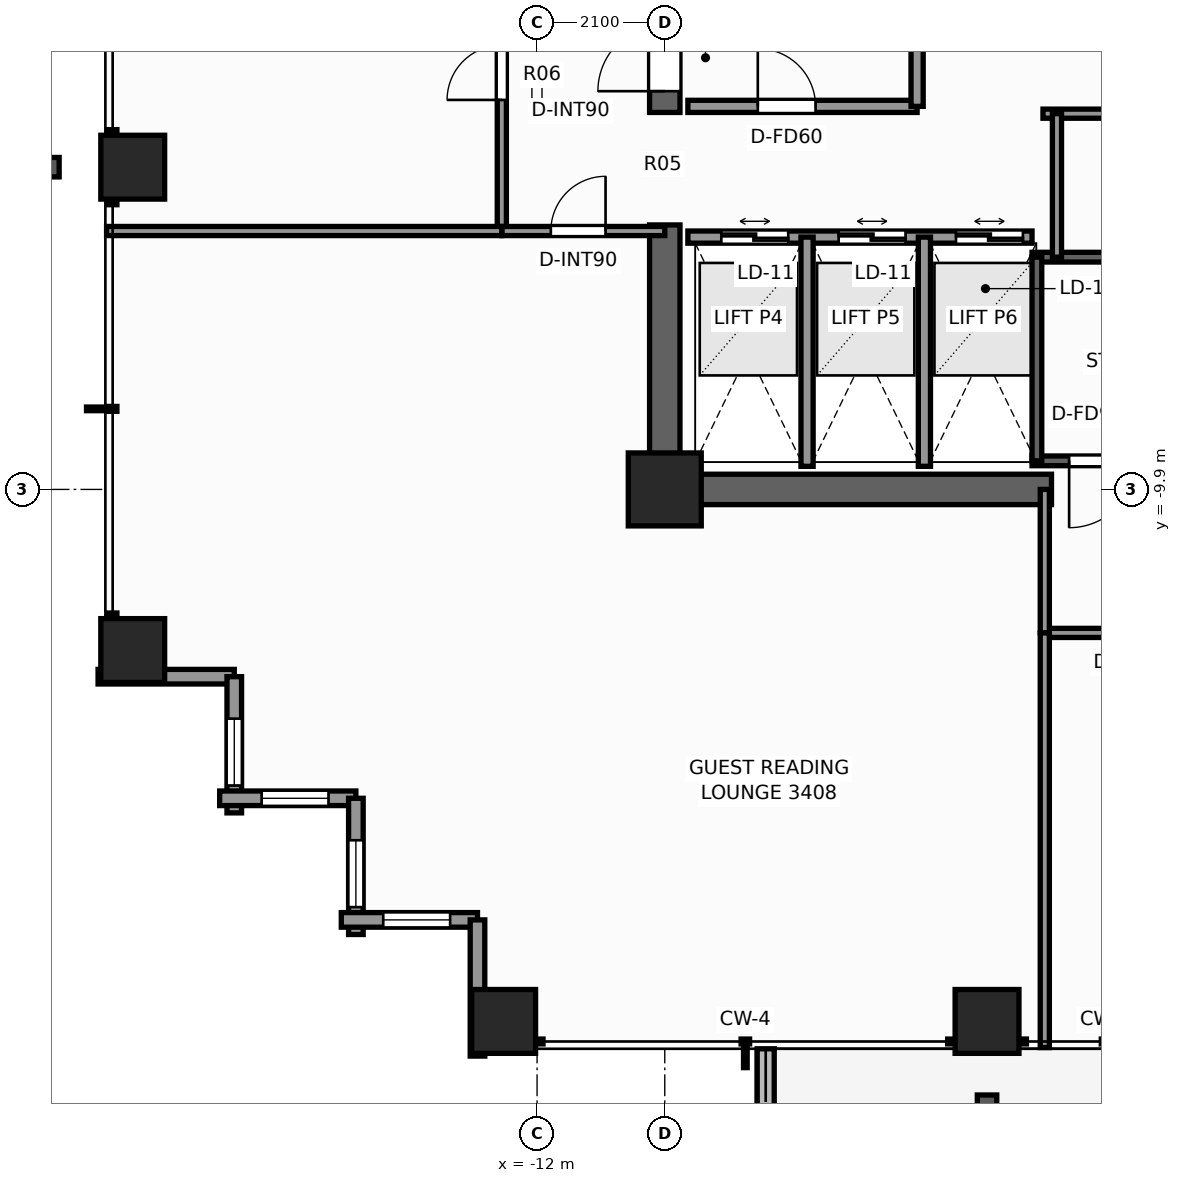
"""IFC4 building model, lengths in metres.
Left out: names, types, materials, properties, quantities, classifications, styles, units other than length and angle.
Written with IfcOpenShell. Run it as: python <this file> out.ifc"""

import sys

from ifc_helpers import new_model, si_unit, direction, frame, frame_2d, origin, origin_2d, place, context, subcontext, project, spatial, rectangle, extrude, element, fill, save


model = new_model("IFC4")
c1 = context("Model", 3, precision=1e-05, world=origin(), true_north=direction((0.0, 1.0)))
c2 = subcontext(c1, "Body", "Model", "MODEL_VIEW")
j1 = project(units=[si_unit("LENGTHUNIT", "METRE"), si_unit("PLANEANGLEUNIT", "RADIAN")], contexts=[c1])
p1 = place(None, origin())
s1 = spatial("IfcSite", under=j1, at=p1, CompositionType="ELEMENT")
p2 = place(p1, origin())
s2 = spatial("IfcBuilding", under=s1, at=p2, CompositionType="ELEMENT")
p3 = place(p2, frame((0.0, 0.0, 118.4)))
s3 = spatial("IfcBuildingStorey", under=s2, at=p3, CompositionType="ELEMENT", Elevation=118.4)
p4 = place(p3, frame((-3.54, -9.9, 0.0), z_axis=(0.0, 0.0, 1.0), x_axis=(-1.0, 0.0, 0.0)))
e1 = element("IfcWall", 1, at=p4, inside=s3, PredefinedType="SHEAR", context=c2, shape_type="SweptSolid", body=[
    extrude(rectangle(XDim=6.61, YDim=0.5, at=frame_2d((3.305, 0.0))), origin(), (0.0, 0.0, 1.0), 3.3),
])
p5 = place(p3, frame((-9.9, -9.65, 0.0), z_axis=(0.0, 0.0, 1.0), x_axis=(0.0, 1.0, 0.0)))
e2 = element("IfcWall", 2, at=p5, inside=s3, PredefinedType="SHEAR", context=c2, shape_type="SweptSolid", body=[
    extrude(rectangle(XDim=4.1, YDim=0.5, at=frame_2d((2.05, 0.0))), origin(), (0.0, 0.0, 1.0), 3.3),
])
p6 = place(p3, frame((-9.9, -3.7, 0.0), z_axis=(0.0, 0.0, 1.0), x_axis=(0.0, 1.0, 0.0)))
e3 = element("IfcWall", 3, at=p6, inside=s3, PredefinedType="SHEAR", context=c2, shape_type="SweptSolid", body=[
    extrude(rectangle(XDim=13.35, YDim=0.5, at=frame_2d((6.675, 0.0))), origin(), (0.0, 0.0, 1.0), 3.3),
])
p7 = place(p6, frame((0.35, 0.0, 0.0)))
e4 = element("IfcOpeningElement", 4, at=p7, cuts=e3, PredefinedType="OPENING", context=c2, shape_type="SweptSolid", body=[
    extrude(rectangle(XDim=1.1, YDim=2.2, at=frame_2d((0.55, 1.1))), frame((0.0, 0.26, 0.0), z_axis=(0.0, -1.0, 0.0), x_axis=(1.0, 0.0, 0.0)), (0.0, 0.0, 1.0), 0.52),
])
p8 = place(p3, frame((-9.9, -9.9, 0.0), z_axis=(0.0, 0.0, 1.0), x_axis=(1.0, 0.0, 0.0)))
e5 = element("IfcColumn", 5, at=p8, inside=s3, PredefinedType="COLUMN", context=c2, shape_type="SweptSolid", body=[
    extrude(rectangle(XDim=1.2, YDim=1.2, at=origin_2d()), origin(), (0.0, 0.0, 1.0), 3.3),
])
for number, where, z_axis, x_axis in (
    (6, (-12.55, -18.65, 0.0), (0.0, 0.0, 1.0), (1.0, 0.0, 0.0)),
    (7, (-4.6, -18.65, 0.0), (0.0, 0.0, 1.0), (1.0, 0.0, 0.0)),
    (8, (-18.65, -12.55, 0.0), (0.0, 0.0, 1.0), (1.0, 0.0, 0.0)),
    (9, (-18.65, -4.6, 0.0), (0.0, 0.0, 1.0), (1.0, 0.0, 0.0)),
):
    element("IfcColumn", number, at=place(p3, frame(where, z_axis=z_axis, x_axis=x_axis)), inside=s3, PredefinedType="COLUMN", context=c2, shape_type="SweptSolid", body=[
        extrude(rectangle(XDim=1.05, YDim=1.05, at=origin_2d()), origin(), (0.0, 0.0, 1.0), 3.3),
    ])
p9 = place(p3, frame((-8.24, -19.1, -0.04), z_axis=(0.0, 0.0, 1.0), x_axis=(0.0, -1.0, 0.0)))
e10 = element("IfcWall", 10, at=p9, inside=s3, PredefinedType="PARAPET", context=c2, shape_type="SweptSolid", body=[
    extrude(rectangle(XDim=2.674, YDim=0.28, at=frame_2d((1.337, 0.0))), origin(), (0.0, 0.0, 1.0), 0.42),
])
p10 = place(p3, frame((-16.98, -12.98, 0.0), z_axis=(0.0, 0.0, 1.0), x_axis=(-1.0, 0.0, 0.0)))
e11 = element("IfcWall", 11, at=p10, inside=s3, PredefinedType="STANDARD", context=c2, shape_type="SweptSolid", body=[
    extrude(rectangle(XDim=2.24, YDim=0.24, at=frame_2d((1.12, 0.0))), origin(), (0.0, 0.0, 1.0), 2.459),
])
p11 = place(p3, frame((-16.98, -15.22, 0.0), z_axis=(0.0, 0.0, 1.0), x_axis=(0.0, 1.0, 0.0)))
e12 = element("IfcWall", 12, at=p11, inside=s3, PredefinedType="STANDARD", context=c2, shape_type="SweptSolid", body=[
    extrude(rectangle(XDim=2.24, YDim=0.24, at=frame_2d((1.12, 0.0))), origin(), (0.0, 0.0, 1.0), 2.459),
])
p12 = place(p11, frame((0.45, 0.0, 0.65)))
e13 = element("IfcOpeningElement", 13, at=p12, cuts=e12, PredefinedType="OPENING", context=c2, shape_type="SweptSolid", body=[
    extrude(rectangle(XDim=1.1, YDim=1.45, at=frame_2d((0.55, 0.725))), frame((0.0, 0.13, 0.0), z_axis=(0.0, -1.0, 0.0), x_axis=(1.0, 0.0, 0.0)), (0.0, 0.0, 1.0), 0.26),
])
p13 = place(p3, frame((-14.98, -14.98, 0.0), z_axis=(0.0, 0.0, 1.0), x_axis=(-1.0, 0.0, 0.0)))
e14 = element("IfcWall", 14, at=p13, inside=s3, PredefinedType="STANDARD", context=c2, shape_type="SweptSolid", body=[
    extrude(rectangle(XDim=2.24, YDim=0.24, at=frame_2d((1.12, 0.0))), origin(), (0.0, 0.0, 1.0), 2.459),
])
p14 = place(p13, frame((0.45, 0.0, 0.65)))
e15 = element("IfcOpeningElement", 15, at=p14, cuts=e14, PredefinedType="OPENING", context=c2, shape_type="SweptSolid", body=[
    extrude(rectangle(XDim=1.1, YDim=1.45, at=frame_2d((0.55, 0.725))), frame((0.0, 0.13, 0.0), z_axis=(0.0, -1.0, 0.0), x_axis=(1.0, 0.0, 0.0)), (0.0, 0.0, 1.0), 0.26),
])
p15 = place(p3, frame((-14.98, -17.22, 0.0), z_axis=(0.0, 0.0, 1.0), x_axis=(0.0, 1.0, 0.0)))
e16 = element("IfcWall", 16, at=p15, inside=s3, PredefinedType="STANDARD", context=c2, shape_type="SweptSolid", body=[
    extrude(rectangle(XDim=2.24, YDim=0.24, at=frame_2d((1.12, 0.0))), origin(), (0.0, 0.0, 1.0), 2.459),
])
p16 = place(p15, frame((0.45, 0.0, 0.65)))
e17 = element("IfcOpeningElement", 17, at=p16, cuts=e16, PredefinedType="OPENING", context=c2, shape_type="SweptSolid", body=[
    extrude(rectangle(XDim=1.1, YDim=1.45, at=frame_2d((0.55, 0.725))), frame((0.0, 0.13, 0.0), z_axis=(0.0, -1.0, 0.0), x_axis=(1.0, 0.0, 0.0)), (0.0, 0.0, 1.0), 0.26),
])
p17 = place(p3, frame((-12.98, -16.98, 0.0), z_axis=(0.0, 0.0, 1.0), x_axis=(-1.0, 0.0, 0.0)))
e18 = element("IfcWall", 18, at=p17, inside=s3, PredefinedType="STANDARD", context=c2, shape_type="SweptSolid", body=[
    extrude(rectangle(XDim=2.24, YDim=0.24, at=frame_2d((1.12, 0.0))), origin(), (0.0, 0.0, 1.0), 2.459),
])
p18 = place(p17, frame((0.45, 0.0, 0.65)))
e19 = element("IfcOpeningElement", 19, at=p18, cuts=e18, PredefinedType="OPENING", context=c2, shape_type="SweptSolid", body=[
    extrude(rectangle(XDim=1.1, YDim=1.45, at=frame_2d((0.55, 0.725))), frame((0.0, 0.13, 0.0), z_axis=(0.0, -1.0, 0.0), x_axis=(1.0, 0.0, 0.0)), (0.0, 0.0, 1.0), 0.26),
])
p19 = place(p3, frame((-12.98, -19.22, 0.0), z_axis=(0.0, 0.0, 1.0), x_axis=(0.0, 1.0, 0.0)))
e20 = element("IfcWall", 20, at=p19, inside=s3, PredefinedType="STANDARD", context=c2, shape_type="SweptSolid", body=[
    extrude(rectangle(XDim=2.24, YDim=0.24, at=frame_2d((1.12, 0.0))), origin(), (0.0, 0.0, 1.0), 2.459),
])
p20 = place(p3, frame((3.86, -9.43, 0.0), z_axis=(0.0, 0.0, 1.0), x_axis=(-1.0, 0.0, 0.0)))
e21 = element("IfcWall", 21, at=p20, inside=s3, PredefinedType="SHEAR", context=c2, shape_type="SweptSolid", body=[
    extrude(rectangle(XDim=7.72, YDim=0.16, at=frame_2d((3.86, 0.0))), origin(), (0.0, 0.0, 1.0), 3.3),
])
p21 = place(p20, frame((6.01, 0.0, 0.0)))
e22 = element("IfcOpeningElement", 22, at=p21, cuts=e21, PredefinedType="OPENING", context=c2, shape_type="SweptSolid", body=[
    extrude(rectangle(XDim=1.1, YDim=2.2, at=frame_2d((0.55, 1.1))), frame((0.0, 0.09, 0.0), z_axis=(0.0, -1.0, 0.0), x_axis=(1.0, 0.0, 0.0)), (0.0, 0.0, 1.0), 0.18),
])
p22 = place(p3, frame((-3.86, -6.08, 0.0), z_axis=(0.0, 0.0, 1.0), x_axis=(1.0, 0.0, 0.0)))
e23 = element("IfcWall", 23, at=p22, inside=s3, PredefinedType="SHEAR", context=c2, shape_type="SweptSolid", body=[
    extrude(rectangle(XDim=7.72, YDim=0.16, at=frame_2d((3.86, 0.0))), origin(), (0.0, 0.0, 1.0), 3.3),
])
p23 = place(p3, frame((-3.78, -9.43, 0.0), z_axis=(0.0, 0.0, 1.0), x_axis=(0.0, 1.0, 0.0)))
e24 = element("IfcWall", 24, at=p23, inside=s3, PredefinedType="SHEAR", context=c2, shape_type="SweptSolid", body=[
    extrude(rectangle(XDim=3.35, YDim=0.16, at=frame_2d((1.675, 0.0))), origin(), (0.0, 0.0, 1.0), 3.3),
])
p24 = place(p3, frame((-9.52, -3.6, 0.0), z_axis=(0.0, 0.0, 1.0), x_axis=(1.0, 0.0, 0.0)))
e25 = element("IfcWall", 25, at=p24, inside=s3, PredefinedType="SOLIDWALL", context=c2, shape_type="SweptSolid", body=[
    extrude(rectangle(XDim=3.77, YDim=0.2, at=frame_2d((1.885, 0.0))), origin(), (0.0, 0.0, 1.0), 3.08),
])
p25 = place(p24, frame((1.15, 0.0, 0.0)))
e26 = element("IfcOpeningElement", 26, at=p25, cuts=e25, PredefinedType="OPENING", context=c2, shape_type="SweptSolid", body=[
    extrude(rectangle(XDim=0.95, YDim=2.06, at=frame_2d((0.475, 1.03))), frame((0.0, 0.11, 0.0), z_axis=(0.0, -1.0, 0.0), x_axis=(1.0, 0.0, 0.0)), (0.0, 0.0, 1.0), 0.22),
])
p26 = place(p3, frame((-5.75, -3.6, 0.0), z_axis=(0.0, 0.0, 1.0), x_axis=(0.0, 1.0, 0.0)))
e27 = element("IfcWall", 27, at=p26, inside=s3, PredefinedType="SOLIDWALL", context=c2, shape_type="SweptSolid", body=[
    extrude(rectangle(XDim=5.57, YDim=0.2, at=frame_2d((2.785, 0.0))), origin(), (0.0, 0.0, 1.0), 2.715),
])
p27 = place(p26, frame((2.75, 0.0, 0.0)))
e28 = element("IfcOpeningElement", 28, at=p27, cuts=e27, PredefinedType="OPENING", context=c2, shape_type="SweptSolid", body=[
    extrude(rectangle(XDim=1.1, YDim=2.2, at=frame_2d((0.55, 1.1))), frame((0.0, 0.11, 0.0), z_axis=(0.0, -1.0, 0.0), x_axis=(1.0, 0.0, 0.0)), (0.0, 0.0, 1.0), 0.22),
])
p28 = place(p3, frame((-9.52, -5.75, 0.0), z_axis=(0.0, 0.0, 1.0), x_axis=(1.0, 0.0, 0.0)))
e29 = element("IfcWall", 29, at=p28, inside=s3, PredefinedType="SOLIDWALL", context=c2, shape_type="SweptSolid", body=[
    extrude(rectangle(XDim=5.66, YDim=0.2, at=frame_2d((2.83, 0.0))), origin(), (0.0, 0.0, 1.0), 3.08),
])
p29 = place(p28, frame((0.55, 0.0, 0.0)))
e30 = element("IfcOpeningElement", 30, at=p29, cuts=e29, PredefinedType="OPENING", context=c2, shape_type="SweptSolid", body=[
    extrude(rectangle(XDim=1.1, YDim=2.2, at=frame_2d((0.55, 1.1))), frame((0.0, 0.11, 0.0), z_axis=(0.0, -1.0, 0.0), x_axis=(1.0, 0.0, 0.0)), (0.0, 0.0, 1.0), 0.22),
])
p30 = place(p28, frame((2.48, 0.0, 0.0)))
e31 = element("IfcOpeningElement", 31, at=p30, cuts=e29, PredefinedType="OPENING", context=c2, shape_type="SweptSolid", body=[
    extrude(rectangle(XDim=1.1, YDim=2.2, at=frame_2d((0.55, 1.1))), frame((0.0, 0.11, 0.0), z_axis=(0.0, -1.0, 0.0), x_axis=(1.0, 0.0, 0.0)), (0.0, 0.0, 1.0), 0.22),
])
p31 = place(p28, frame((4.41, 0.0, 0.0)))
e32 = element("IfcOpeningElement", 32, at=p31, cuts=e29, PredefinedType="OPENING", context=c2, shape_type="SweptSolid", body=[
    extrude(rectangle(XDim=1.1, YDim=2.2, at=frame_2d((0.55, 1.1))), frame((0.0, 0.11, 0.0), z_axis=(0.0, -1.0, 0.0), x_axis=(1.0, 0.0, 0.0)), (0.0, 0.0, 1.0), 0.22),
])
for number, where, z_axis, x_axis in (
    (33, (-7.56, -9.52, 0.0), (0.0, 0.0, 1.0), (0.0, 1.0, 0.0)),
    (34, (-5.63, -9.52, 0.0), (0.0, 0.0, 1.0), (0.0, 1.0, 0.0)),
):
    element("IfcWall", number, at=place(p3, frame(where, z_axis=z_axis, x_axis=x_axis)), inside=s3, PredefinedType="SOLIDWALL", context=c2, shape_type="SweptSolid", body=[
        extrude(rectangle(XDim=3.77, YDim=0.2, at=frame_2d((1.885, 0.0))), origin(), (0.0, 0.0, 1.0), 3.08),
    ])
p32 = place(p3, frame((-3.68, -3.72, 0.0), z_axis=(0.0, 0.0, 1.0), x_axis=(1.0, 0.0, 0.0)))
e35 = element("IfcWall", 35, at=p32, inside=s3, PredefinedType="PARTITIONING", context=c2, shape_type="SweptSolid", body=[
    extrude(rectangle(XDim=7.36, YDim=0.15, at=frame_2d((3.68, 0.0))), origin(), (0.0, 0.0, 1.0), 3.08),
])
p33 = place(p3, frame((-3.45, -6.08, 0.0), z_axis=(0.0, 0.0, 1.0), x_axis=(0.0, 1.0, 0.0)))
e36 = element("IfcWall", 36, at=p33, inside=s3, PredefinedType="PARTITIONING", context=c2, shape_type="SweptSolid", body=[
    extrude(rectangle(XDim=2.36, YDim=0.15, at=frame_2d((1.18, 0.0))), origin(), (0.0, 0.0, 1.0), 3.08),
])
p34 = place(p3, frame((-3.65, -12.26, 0.0), z_axis=(0.0, 0.0, 1.0), x_axis=(1.0, 0.0, 0.0)))
e37 = element("IfcWall", 37, at=p34, inside=s3, PredefinedType="PARTITIONING", context=c2, shape_type="SweptSolid", body=[
    extrude(rectangle(XDim=15.91, YDim=0.15, at=frame_2d((7.955, 0.0))), origin(), (0.0, 0.0, 1.0), 2.292),
])
p35 = place(p34, frame((0.992, 0.0, 0.0)))
e38 = element("IfcOpeningElement", 38, at=p35, cuts=e37, PredefinedType="OPENING", context=c2, shape_type="SweptSolid", body=[
    extrude(rectangle(XDim=0.9, YDim=2.06, at=frame_2d((0.45, 1.03))), frame((0.0, 0.085, 0.0), z_axis=(0.0, -1.0, 0.0), x_axis=(1.0, 0.0, 0.0)), (0.0, 0.0, 1.0), 0.17),
])
p36 = place(p34, frame((5.019, 0.0, 0.0)))
e39 = element("IfcOpeningElement", 39, at=p36, cuts=e37, PredefinedType="OPENING", context=c2, shape_type="SweptSolid", body=[
    extrude(rectangle(XDim=0.95, YDim=2.06, at=frame_2d((0.475, 1.03))), frame((0.0, 0.085, 0.0), z_axis=(0.0, -1.0, 0.0), x_axis=(1.0, 0.0, 0.0)), (0.0, 0.0, 1.0), 0.17),
])
p37 = place(p34, frame((11.288, 0.0, 0.0)))
e40 = element("IfcOpeningElement", 40, at=p37, cuts=e37, PredefinedType="OPENING", context=c2, shape_type="SweptSolid", body=[
    extrude(rectangle(XDim=0.95, YDim=2.06, at=frame_2d((0.475, 1.03))), frame((0.0, 0.085, 0.0), z_axis=(0.0, -1.0, 0.0), x_axis=(1.0, 0.0, 0.0)), (0.0, 0.0, 1.0), 0.17),
])
p38 = place(p3, frame((-3.65, -12.26, 0.0), z_axis=(0.0, 0.0, 1.0), x_axis=(0.0, 1.0, 0.0)))
e41 = element("IfcWall", 41, at=p38, inside=s3, PredefinedType="PARTITIONING", context=c2, shape_type="SweptSolid", body=[
    extrude(rectangle(XDim=2.36, YDim=0.15, at=frame_2d((1.18, 0.0))), origin(), (0.0, 0.0, 1.0), 3.08),
])
p39 = place(p3, frame((-12.58, -5.65, 0.0), z_axis=(0.0, 0.0, 1.0), x_axis=(0.0, 1.0, 0.0)))
e42 = element("IfcWall", 42, at=p39, inside=s3, PredefinedType="PARTITIONING", context=c2, shape_type="SweptSolid", body=[
    extrude(rectangle(XDim=3.6, YDim=0.15, at=frame_2d((1.8, 0.0))), origin(), (0.0, 0.0, 1.0), 2.292),
])
p40 = place(p39, frame((2.156, 0.0, 0.0)))
e43 = element("IfcOpeningElement", 43, at=p40, cuts=e42, PredefinedType="OPENING", context=c2, shape_type="SweptSolid", body=[
    extrude(rectangle(XDim=0.9, YDim=2.06, at=frame_2d((0.45, 1.03))), frame((0.0, 0.085, 0.0), z_axis=(0.0, -1.0, 0.0), x_axis=(1.0, 0.0, 0.0)), (0.0, 0.0, 1.0), 0.17),
])
p41 = place(p3, frame((-12.58, -5.65, 0.0), z_axis=(0.0, 0.0, 1.0), x_axis=(1.0, 0.0, 0.0)))
e44 = element("IfcWall", 44, at=p41, inside=s3, PredefinedType="PARTITIONING", context=c2, shape_type="SweptSolid", body=[
    extrude(rectangle(XDim=2.68, YDim=0.15, at=frame_2d((1.34, 0.0))), origin(), (0.0, 0.0, 1.0), 3.08),
])
p42 = place(p41, frame((0.806, 0.0, 0.0)))
e45 = element("IfcOpeningElement", 45, at=p42, cuts=e44, PredefinedType="OPENING", context=c2, shape_type="SweptSolid", body=[
    extrude(rectangle(XDim=0.9, YDim=2.06, at=frame_2d((0.45, 1.03))), frame((0.0, 0.085, 0.0), z_axis=(0.0, -1.0, 0.0), x_axis=(1.0, 0.0, 0.0)), (0.0, 0.0, 1.0), 0.17),
])
p43 = place(p3, frame((-19.08, -5.65, 0.0), z_axis=(0.0, 0.0, 1.0), x_axis=(1.0, 0.0, 0.0)))
e46 = element("IfcWall", 46, at=p43, inside=s3, PredefinedType="PARTITIONING", context=c2, shape_type="SweptSolid", body=[
    extrude(rectangle(XDim=6.5, YDim=0.15, at=frame_2d((3.25, 0.0))), origin(), (0.0, 0.0, 1.0), 2.449),
])
p44 = place(p3, frame((-3.65, -19.08, 0.0), z_axis=(0.0, 0.0, 1.0), x_axis=(0.0, 1.0, 0.0)))
e47 = element("IfcWall", 47, at=p44, inside=s3, PredefinedType="PARTITIONING", context=c2, shape_type="SweptSolid", body=[
    extrude(rectangle(XDim=6.82, YDim=0.15, at=frame_2d((3.41, 0.0))), origin(), (0.0, 0.0, 1.0), 2.449),
])
p45 = place(p12, origin())
e48 = element("IfcWindow", 48, at=p45, inside=s3, PartitioningType="SINGLE_PANEL", PredefinedType="WINDOW", context=c2, shape_type="SweptSolid", body=[
    extrude(rectangle(XDim=1.1, YDim=1.45, at=frame_2d((0.55, 0.725))), frame((0.0, 0.03, 0.0), z_axis=(0.0, -1.0, 0.0), x_axis=(1.0, 0.0, 0.0)), (0.0, 0.0, 1.0), 0.06),
])
fill(e13, e48)
p46 = place(p14, origin())
e49 = element("IfcWindow", 49, at=p46, inside=s3, PartitioningType="SINGLE_PANEL", PredefinedType="WINDOW", context=c2, shape_type="SweptSolid", body=[
    extrude(rectangle(XDim=1.1, YDim=1.45, at=frame_2d((0.55, 0.725))), frame((0.0, 0.03, 0.0), z_axis=(0.0, -1.0, 0.0), x_axis=(1.0, 0.0, 0.0)), (0.0, 0.0, 1.0), 0.06),
])
fill(e15, e49)
p47 = place(p16, origin())
e50 = element("IfcWindow", 50, at=p47, inside=s3, PartitioningType="SINGLE_PANEL", PredefinedType="WINDOW", context=c2, shape_type="SweptSolid", body=[
    extrude(rectangle(XDim=1.1, YDim=1.45, at=frame_2d((0.55, 0.725))), frame((0.0, 0.03, 0.0), z_axis=(0.0, -1.0, 0.0), x_axis=(1.0, 0.0, 0.0)), (0.0, 0.0, 1.0), 0.06),
])
fill(e17, e50)
p48 = place(p18, origin())
e51 = element("IfcWindow", 51, at=p48, inside=s3, PartitioningType="SINGLE_PANEL", PredefinedType="WINDOW", context=c2, shape_type="SweptSolid", body=[
    extrude(rectangle(XDim=1.1, YDim=1.45, at=frame_2d((0.55, 0.725))), frame((0.0, 0.03, 0.0), z_axis=(0.0, -1.0, 0.0), x_axis=(1.0, 0.0, 0.0)), (0.0, 0.0, 1.0), 0.06),
])
fill(e19, e51)
p49 = place(p21, origin())
e52 = element("IfcDoor", 52, at=p49, inside=s3, OperationType="SINGLE_SWING_RIGHT", PredefinedType="DOOR", context=c2, shape_type="SweptSolid", body=[
    extrude(rectangle(XDim=1.1, YDim=2.2, at=frame_2d((0.55, 1.1))), frame((0.0, 0.025, 0.0), z_axis=(0.0, -1.0, 0.0), x_axis=(1.0, 0.0, 0.0)), (0.0, 0.0, 1.0), 0.05),
])
fill(e22, e52)
p50 = place(p7, origin())
e53 = element("IfcDoor", 53, at=p50, inside=s3, OperationType="SINGLE_SWING_LEFT", PredefinedType="DOOR", context=c2, shape_type="SweptSolid", body=[
    extrude(rectangle(XDim=1.1, YDim=2.2, at=frame_2d((0.55, 1.1))), frame((0.0, 0.025, 0.0), z_axis=(0.0, -1.0, 0.0), x_axis=(1.0, 0.0, 0.0)), (0.0, 0.0, 1.0), 0.05),
])
fill(e4, e53)
p51 = place(p29, origin())
e54 = element("IfcDoor", 54, at=p51, inside=s3, OperationType="DOUBLE_DOOR_SLIDING", PredefinedType="DOOR", context=c2, shape_type="SweptSolid", body=[
    extrude(rectangle(XDim=1.1, YDim=2.2, at=frame_2d((0.55, 1.1))), frame((0.0, 0.025, 0.0), z_axis=(0.0, -1.0, 0.0), x_axis=(1.0, 0.0, 0.0)), (0.0, 0.0, 1.0), 0.05),
])
fill(e30, e54)
p52 = place(p30, origin())
e55 = element("IfcDoor", 55, at=p52, inside=s3, OperationType="DOUBLE_DOOR_SLIDING", PredefinedType="DOOR", context=c2, shape_type="SweptSolid", body=[
    extrude(rectangle(XDim=1.1, YDim=2.2, at=frame_2d((0.55, 1.1))), frame((0.0, 0.025, 0.0), z_axis=(0.0, -1.0, 0.0), x_axis=(1.0, 0.0, 0.0)), (0.0, 0.0, 1.0), 0.05),
])
fill(e31, e55)
p53 = place(p31, origin())
e56 = element("IfcDoor", 56, at=p53, inside=s3, OperationType="DOUBLE_DOOR_SLIDING", PredefinedType="DOOR", context=c2, shape_type="SweptSolid", body=[
    extrude(rectangle(XDim=1.1, YDim=2.2, at=frame_2d((0.55, 1.1))), frame((0.0, 0.025, 0.0), z_axis=(0.0, -1.0, 0.0), x_axis=(1.0, 0.0, 0.0)), (0.0, 0.0, 1.0), 0.05),
])
fill(e32, e56)
p54 = place(p25, origin())
e57 = element("IfcDoor", 57, at=p54, inside=s3, OperationType="SINGLE_SWING_LEFT", PredefinedType="DOOR", context=c2, shape_type="SweptSolid", body=[
    extrude(rectangle(XDim=0.95, YDim=2.06, at=frame_2d((0.475, 1.03))), frame((0.0, 0.025, 0.0), z_axis=(0.0, -1.0, 0.0), x_axis=(1.0, 0.0, 0.0)), (0.0, 0.0, 1.0), 0.05),
])
fill(e26, e57)
p55 = place(p40, origin())
e58 = element("IfcDoor", 58, at=p55, inside=s3, OperationType="SINGLE_SWING_LEFT", PredefinedType="DOOR", context=c2, shape_type="SweptSolid", body=[
    extrude(rectangle(XDim=0.9, YDim=2.06, at=frame_2d((0.45, 1.03))), frame((0.0, 0.025, 0.0), z_axis=(0.0, -1.0, 0.0), x_axis=(1.0, 0.0, 0.0)), (0.0, 0.0, 1.0), 0.05),
])
fill(e43, e58)
p56 = place(p42, origin())
e59 = element("IfcDoor", 59, at=p56, inside=s3, OperationType="SINGLE_SWING_RIGHT", PredefinedType="DOOR", context=c2, shape_type="SweptSolid", body=[
    extrude(rectangle(XDim=0.9, YDim=2.06, at=frame_2d((0.45, 1.03))), frame((0.0, 0.025, 0.0), z_axis=(0.0, -1.0, 0.0), x_axis=(1.0, 0.0, 0.0)), (0.0, 0.0, 1.0), 0.05),
])
fill(e45, e59)
save(model, sys.argv[1])
